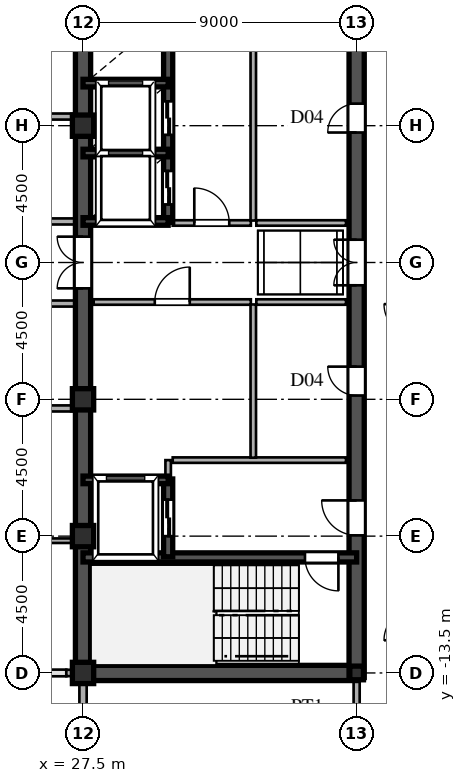
"""IFC4 building model, lengths in metres.
Left out: names, types, materials, properties, quantities, classifications, styles, units other than length and angle.
Written with IfcOpenShell. Run it as: python <this file> out.ifc"""

import sys

from ifc_helpers import new_model, si_unit, direction, frame, frame_2d, origin, origin_2d, place, context, subcontext, project, spatial, rectangle, hollow_rectangle, i_section, extrude, source, transform, mapped, element, fill, save


model = new_model("IFC4")
c1 = context("Model", 3, precision=1e-05, world=origin(), true_north=direction((0.0, 1.0)))
c2 = subcontext(c1, "Body", "Model", "MODEL_VIEW")
j1 = project(units=[si_unit("LENGTHUNIT", "METRE"), si_unit("PLANEANGLEUNIT", "RADIAN")], contexts=[c1])
p1 = place(None, origin())
s1 = spatial("IfcSite", under=j1, at=p1, CompositionType="ELEMENT")
p2 = place(p1, origin())
s2 = spatial("IfcBuilding", under=s1, at=p2, CompositionType="ELEMENT")
p3 = place(p2, frame((0.0, 0.0, 250.65)))
s3 = spatial("IfcBuildingStorey", under=s2, at=p3, CompositionType="ELEMENT", Elevation=250.65)
m1 = source(origin(), c2, "Body", "SweptSolid", [
    extrude(hollow_rectangle(XDim=0.7, YDim=0.7, WallThickness=0.03, at=origin_2d()), origin(), (0.0, 0.0, 1.0), 3.75),
])
for number, where, z_axis, x_axis in (
    (1, (27.5, -13.5, 0.0), (0.0, 0.0, 1.0), (1.0, 0.0, 0.0)),
    (2, (27.5, -9.0, 0.0), (0.0, 0.0, 1.0), (1.0, 0.0, 0.0)),
    (3, (27.5, -4.5, 0.0), (0.0, 0.0, 1.0), (1.0, 0.0, 0.0)),
    (4, (27.5, 4.5, 0.0), (0.0, 0.0, 1.0), (1.0, 0.0, 0.0)),
):
    element("IfcColumn", number, at=place(p3, frame(where, z_axis=z_axis, x_axis=x_axis)), inside=s3, PredefinedType="COLUMN", context=c2, shape_type="MappedRepresentation", body=[
        mapped(m1, transform((0.0, 0.0, 0.0), scale=1.0)),
    ])
m2 = source(origin(), c2, "Body", "SweptSolid", [
    extrude(i_section(OverallWidth=0.45, OverallDepth=0.45, WebThickness=0.016, FlangeThickness=0.025, at=origin_2d()), origin(), (0.0, 0.0, 1.0), 3.75),
])
p4 = place(p3, frame((36.5, -13.5, 0.0), z_axis=(0.0, 0.0, 1.0), x_axis=(1.0, 0.0, 0.0)))
e5 = element("IfcColumn", 5, at=p4, inside=s3, PredefinedType="COLUMN", context=c2, shape_type="MappedRepresentation", body=[
    mapped(m2, transform((0.0, 0.0, 0.0), scale=1.0)),
])
p5 = place(p3, frame((27.5, -15.98, 0.0), z_axis=(0.0, 0.0, 1.0), x_axis=(0.0, 1.0, 0.0)))
e6 = element("IfcWall", 6, at=p5, inside=s3, PredefinedType="SOLIDWALL", context=c2, shape_type="SweptSolid", body=[
    extrude(rectangle(XDim=1.605, YDim=0.24, at=frame_2d((0.803, 0.0))), origin(), (0.0, 0.0, 1.0), 3.53),
])
p6 = place(p3, frame((27.5, -14.375, 0.0), z_axis=(0.0, 0.0, 1.0), x_axis=(0.0, 1.0, 0.0)))
e7 = element("IfcWall", 7, at=p6, inside=s3, PredefinedType="SOLIDWALL", context=c2, shape_type="SweptSolid", body=[
    extrude(rectangle(XDim=0.62, YDim=0.24, at=frame_2d((0.31, 0.0))), origin(), (0.0, 0.0, 1.0), 3.03),
])
p7 = place(p3, frame((26.95, -13.5, 0.0), z_axis=(0.0, 0.0, 1.0), x_axis=(1.0, 0.0, 0.0)))
e8 = element("IfcWall", 8, at=p7, inside=s3, PredefinedType="SOLIDWALL", context=c2, shape_type="SweptSolid", body=[
    extrude(rectangle(XDim=0.54, YDim=0.21, at=frame_2d((0.27, 0.0))), origin(), (0.0, 0.0, 1.0), 3.03),
])
for number, where, z_axis, x_axis in (
    (9, (27.5, -13.5, 0.0), (0.0, 0.0, 1.0), (0.0, 1.0, 0.0)),
    (10, (27.5, 1.3, 0.0), (0.0, 0.0, 1.0), (0.0, 1.0, 0.0)),
):
    element("IfcWall", number, at=place(p3, frame(where, z_axis=z_axis, x_axis=x_axis)), inside=s3, PredefinedType="SHEAR", context=c2, shape_type="SweptSolid", body=[
        extrude(rectangle(XDim=12.2, YDim=0.5, at=frame_2d((6.1, 0.0))), origin(), (0.0, 0.0, 1.0), 3.53),
    ])
p8 = place(p3, frame((27.5, -1.3, 0.0), z_axis=(0.0, 0.0, 1.0), x_axis=(0.0, 1.0, 0.0)))
e11 = element("IfcWall", 11, at=p8, inside=s3, PredefinedType="SHEAR", context=c2, shape_type="SweptSolid", body=[
    extrude(rectangle(XDim=2.6, YDim=0.5, at=frame_2d((1.3, 0.0))), origin(), (0.0, 0.0, 1.0), 3.53),
])
p9 = place(p8, frame((0.45, 0.0, 0.0)))
e12 = element("IfcOpeningElement", 12, at=p9, cuts=e11, PredefinedType="OPENING", context=c2, shape_type="SweptSolid", body=[
    extrude(rectangle(XDim=1.7, YDim=2.35, at=frame_2d((0.85, 1.175))), frame((0.0, 0.26, 0.0), z_axis=(0.0, -1.0, 0.0), x_axis=(1.0, 0.0, 0.0)), (0.0, 0.0, 1.0), 0.52),
])
p10 = place(p3, frame((27.5, -13.5, 0.0), z_axis=(0.0, 0.0, 1.0), x_axis=(1.0, 0.0, 0.0)))
e13 = element("IfcWall", 13, at=p10, inside=s3, PredefinedType="SHEAR", context=c2, shape_type="SweptSolid", body=[
    extrude(rectangle(XDim=9.0, YDim=0.5, at=frame_2d((4.5, 0.0))), origin(), (0.0, 0.0, 1.0), 3.53),
])
p11 = place(p3, frame((36.5, -13.65, 0.0), z_axis=(0.0, 0.0, 1.0), x_axis=(0.0, 1.0, 0.0)))
e14 = element("IfcWall", 14, at=p11, inside=s3, PredefinedType="SHEAR", context=c2, shape_type="SweptSolid", body=[
    extrude(rectangle(XDim=7.15, YDim=0.5, at=frame_2d((3.575, 0.0))), origin(), (0.0, 0.0, 1.0), 3.53),
])
p12 = place(p11, frame((4.675, 0.0, 0.0)))
e15 = element("IfcOpeningElement", 15, at=p12, cuts=e14, PredefinedType="OPENING", context=c2, shape_type="SweptSolid", body=[
    extrude(rectangle(XDim=1.15, YDim=2.2, at=frame_2d((0.575, 1.1))), frame((0.0, 0.26, 0.0), z_axis=(0.0, -1.0, 0.0), x_axis=(1.0, 0.0, 0.0)), (0.0, 0.0, 1.0), 0.52),
])
p13 = place(p3, frame((36.5, -1.3, 0.0), z_axis=(0.0, 0.0, 1.0), x_axis=(0.0, 1.0, 0.0)))
e16 = element("IfcWall", 16, at=p13, inside=s3, PredefinedType="SHEAR", context=c2, shape_type="SweptSolid", body=[
    extrude(rectangle(XDim=2.6, YDim=0.5, at=frame_2d((1.3, 0.0))), origin(), (0.0, 0.0, 1.0), 3.53),
])
p14 = place(p13, frame((0.55, 0.0, 0.0)))
e17 = element("IfcOpeningElement", 17, at=p14, cuts=e16, PredefinedType="OPENING", context=c2, shape_type="SweptSolid", body=[
    extrude(rectangle(XDim=1.5, YDim=2.3, at=frame_2d((0.75, 1.15))), frame((0.0, 0.26, 0.0), z_axis=(0.0, -1.0, 0.0), x_axis=(1.0, 0.0, 0.0)), (0.0, 0.0, 1.0), 0.52),
])
p15 = place(p3, frame((36.5, -6.5, 0.0), z_axis=(0.0, 0.0, 1.0), x_axis=(0.0, 1.0, 0.0)))
e18 = element("IfcWall", 18, at=p15, inside=s3, PredefinedType="SHEAR", context=c2, shape_type="SweptSolid", body=[
    extrude(rectangle(XDim=5.2, YDim=0.5, at=frame_2d((2.6, 0.0))), origin(), (0.0, 0.0, 1.0), 3.53),
])
p16 = place(p15, frame((2.125, 0.0, 0.0)))
e19 = element("IfcOpeningElement", 19, at=p16, cuts=e18, PredefinedType="OPENING", context=c2, shape_type="SweptSolid", body=[
    extrude(rectangle(XDim=0.95, YDim=2.15, at=frame_2d((0.475, 1.075))), frame((0.0, 0.26, 0.0), z_axis=(0.0, -1.0, 0.0), x_axis=(1.0, 0.0, 0.0)), (0.0, 0.0, 1.0), 0.52),
])
p17 = place(p3, frame((36.5, 1.3, 0.0), z_axis=(0.0, 0.0, 1.0), x_axis=(0.0, 1.0, 0.0)))
e20 = element("IfcWall", 20, at=p17, inside=s3, PredefinedType="SHEAR", context=c2, shape_type="SweptSolid", body=[
    extrude(rectangle(XDim=6.9, YDim=0.5, at=frame_2d((3.45, 0.0))), origin(), (0.0, 0.0, 1.0), 3.53),
])
p18 = place(p17, frame((2.975, 0.0, 0.0)))
e21 = element("IfcOpeningElement", 21, at=p18, cuts=e20, PredefinedType="OPENING", context=c2, shape_type="SweptSolid", body=[
    extrude(rectangle(XDim=0.95, YDim=2.15, at=frame_2d((0.475, 1.075))), frame((0.0, 0.26, 0.0), z_axis=(0.0, -1.0, 0.0), x_axis=(1.0, 0.0, 0.0)), (0.0, 0.0, 1.0), 0.52),
])
p19 = place(p3, frame((27.5, -9.7, 0.0), z_axis=(0.0, 0.0, 1.0), x_axis=(1.0, 0.0, 0.0)))
e22 = element("IfcWall", 22, at=p19, inside=s3, PredefinedType="SHEAR", context=c2, shape_type="SweptSolid", body=[
    extrude(rectangle(XDim=9.0, YDim=0.3, at=frame_2d((4.5, 0.0))), origin(), (0.0, 0.0, 1.0), 3.53),
])
p20 = place(p19, frame((7.3, 0.0, 0.0)))
e23 = element("IfcOpeningElement", 23, at=p20, cuts=e22, PredefinedType="OPENING", context=c2, shape_type="SweptSolid", body=[
    extrude(rectangle(XDim=1.1, YDim=2.2, at=frame_2d((0.55, 1.1))), frame((0.0, 0.16, 0.0), z_axis=(0.0, -1.0, 0.0), x_axis=(1.0, 0.0, 0.0)), (0.0, 0.0, 1.0), 0.32),
])
for number, where, z_axis, x_axis in (
    (24, (27.5, -7.15, 0.0), (0.0, 0.0, 1.0), (1.0, 0.0, 0.0)),
    (25, (27.5, 1.35, 0.0), (0.0, 0.0, 1.0), (1.0, 0.0, 0.0)),
    (26, (27.5, 3.6, 0.0), (0.0, 0.0, 1.0), (1.0, 0.0, 0.0)),
    (27, (27.5, 5.9, 0.0), (0.0, 0.0, 1.0), (1.0, 0.0, 0.0)),
):
    element("IfcWall", number, at=place(p3, frame(where, z_axis=z_axis, x_axis=x_axis)), inside=s3, PredefinedType="SHEAR", context=c2, shape_type="SweptSolid", body=[
        extrude(rectangle(XDim=2.8, YDim=0.25, at=frame_2d((1.4, 0.0))), origin(), (0.0, 0.0, 1.0), 3.53),
    ])
p21 = place(p3, frame((30.3, -9.68, 0.0), z_axis=(0.0, 0.0, 1.0), x_axis=(0.0, 1.0, 0.0)))
e28 = element("IfcWall", 28, at=p21, inside=s3, PredefinedType="SHEAR", context=c2, shape_type="SweptSolid", body=[
    extrude(rectangle(XDim=2.56, YDim=0.3, at=frame_2d((1.28, 0.0))), origin(), (0.0, 0.0, 1.0), 3.53),
])
p22 = place(p21, frame((0.68, 0.0, 0.0)))
e29 = element("IfcOpeningElement", 29, at=p22, cuts=e28, PredefinedType="OPENING", context=c2, shape_type="SweptSolid", body=[
    extrude(rectangle(XDim=1.2, YDim=2.25, at=frame_2d((0.6, 1.125))), frame((0.0, 0.16, 0.0), z_axis=(0.0, -1.0, 0.0), x_axis=(1.0, 0.0, 0.0)), (0.0, 0.0, 1.0), 0.32),
])
p23 = place(p3, frame((30.3, 1.32, 0.0), z_axis=(0.0, 0.0, 1.0), x_axis=(0.0, 1.0, 0.0)))
e30 = element("IfcWall", 30, at=p23, inside=s3, PredefinedType="SHEAR", context=c2, shape_type="SweptSolid", body=[
    extrude(rectangle(XDim=2.28, YDim=0.3, at=frame_2d((1.14, 0.0))), origin(), (0.0, 0.0, 1.0), 3.53),
])
p24 = place(p23, frame((0.59, 0.0, 0.0)))
e31 = element("IfcOpeningElement", 31, at=p24, cuts=e30, PredefinedType="OPENING", context=c2, shape_type="SweptSolid", body=[
    extrude(rectangle(XDim=1.1, YDim=2.2, at=frame_2d((0.55, 1.1))), frame((0.0, 0.16, 0.0), z_axis=(0.0, -1.0, 0.0), x_axis=(1.0, 0.0, 0.0)), (0.0, 0.0, 1.0), 0.32),
])
p25 = place(p3, frame((30.3, 3.6, 0.0), z_axis=(0.0, 0.0, 1.0), x_axis=(0.0, 1.0, 0.0)))
e32 = element("IfcWall", 32, at=p25, inside=s3, PredefinedType="SHEAR", context=c2, shape_type="SweptSolid", body=[
    extrude(rectangle(XDim=2.3, YDim=0.3, at=frame_2d((1.15, 0.0))), origin(), (0.0, 0.0, 1.0), 3.53),
])
p26 = place(p25, frame((0.6, 0.0, 0.0)))
e33 = element("IfcOpeningElement", 33, at=p26, cuts=e32, PredefinedType="OPENING", context=c2, shape_type="SweptSolid", body=[
    extrude(rectangle(XDim=1.1, YDim=2.2, at=frame_2d((0.55, 1.1))), frame((0.0, 0.16, 0.0), z_axis=(0.0, -1.0, 0.0), x_axis=(1.0, 0.0, 0.0)), (0.0, 0.0, 1.0), 0.32),
])
p27 = place(p3, frame((30.3, 5.9, 0.0), z_axis=(0.0, 0.0, 1.0), x_axis=(0.0, 1.0, 0.0)))
e34 = element("IfcWall", 34, at=p27, inside=s3, PredefinedType="SHEAR", context=c2, shape_type="SweptSolid", body=[
    extrude(rectangle(XDim=2.25, YDim=0.3, at=frame_2d((1.125, 0.0))), origin(), (0.0, 0.0, 1.0), 3.53),
])
p28 = place(p3, frame((30.45, -6.5, 0.0), z_axis=(0.0, 0.0, 1.0), x_axis=(1.0, 0.0, 0.0)))
e35 = element("IfcWall", 35, at=p28, inside=s3, PredefinedType="PARTITIONING", context=c2, shape_type="SweptSolid", body=[
    extrude(rectangle(XDim=5.7, YDim=0.18, at=frame_2d((2.85, 0.0))), origin(), (0.0, 0.0, 1.0), 3.53),
])
p29 = place(p3, frame((30.3, -7.12, 0.0), z_axis=(0.0, 0.0, 1.0), x_axis=(0.0, 1.0, 0.0)))
e36 = element("IfcWall", 36, at=p29, inside=s3, PredefinedType="PARTITIONING", context=c2, shape_type="SweptSolid", body=[
    extrude(rectangle(XDim=0.62, YDim=0.18, at=frame_2d((0.31, 0.0))), origin(), (0.0, 0.0, 1.0), 3.53),
])
p30 = place(p3, frame((33.1, -6.42, 0.0), z_axis=(0.0, 0.0, 1.0), x_axis=(0.0, 1.0, 0.0)))
e37 = element("IfcWall", 37, at=p30, inside=s3, PredefinedType="PARTITIONING", context=c2, shape_type="SweptSolid", body=[
    extrude(rectangle(XDim=5.04, YDim=0.18, at=frame_2d((2.52, 0.0))), origin(), (0.0, 0.0, 1.0), 3.53),
])
p31 = place(p3, frame((33.1, 1.38, 0.0), z_axis=(0.0, 0.0, 1.0), x_axis=(0.0, 1.0, 0.0)))
e38 = element("IfcWall", 38, at=p31, inside=s3, PredefinedType="PARTITIONING", context=c2, shape_type="SweptSolid", body=[
    extrude(rectangle(XDim=6.74, YDim=0.18, at=frame_2d((3.37, 0.0))), origin(), (0.0, 0.0, 1.0), 3.53),
])
p32 = place(p3, frame((27.85, -1.3, 0.0), z_axis=(0.0, 0.0, 1.0), x_axis=(1.0, 0.0, 0.0)))
e39 = element("IfcWall", 39, at=p32, inside=s3, PredefinedType="PARTITIONING", context=c2, shape_type="SweptSolid", body=[
    extrude(rectangle(XDim=5.17, YDim=0.18, at=frame_2d((2.585, 0.0))), origin(), (0.0, 0.0, 1.0), 3.53),
])
p33 = place(p32, frame((2.01, 0.0, 0.0)))
e40 = element("IfcOpeningElement", 40, at=p33, cuts=e39, PredefinedType="OPENING", context=c2, shape_type="SweptSolid", body=[
    extrude(rectangle(XDim=1.15, YDim=2.2, at=frame_2d((0.575, 1.1))), frame((0.0, 0.1, 0.0), z_axis=(0.0, -1.0, 0.0), x_axis=(1.0, 0.0, 0.0)), (0.0, 0.0, 1.0), 0.2),
])
p34 = place(p3, frame((30.45, 1.3, 0.0), z_axis=(0.0, 0.0, 1.0), x_axis=(1.0, 0.0, 0.0)))
e41 = element("IfcWall", 41, at=p34, inside=s3, PredefinedType="PARTITIONING", context=c2, shape_type="SweptSolid", body=[
    extrude(rectangle(XDim=2.57, YDim=0.18, at=frame_2d((1.285, 0.0))), origin(), (0.0, 0.0, 1.0), 3.53),
])
p35 = place(p34, frame((0.71, 0.0, 0.0)))
e42 = element("IfcOpeningElement", 42, at=p35, cuts=e41, PredefinedType="OPENING", context=c2, shape_type="SweptSolid", body=[
    extrude(rectangle(XDim=1.15, YDim=2.2, at=frame_2d((0.575, 1.1))), frame((0.0, 0.1, 0.0), z_axis=(0.0, -1.0, 0.0), x_axis=(1.0, 0.0, 0.0)), (0.0, 0.0, 1.0), 0.2),
])
for number, where, z_axis, x_axis in (
    (43, (33.2, -1.3, 0.0), (0.0, 0.0, 1.0), (1.0, 0.0, 0.0)),
    (44, (33.2, 1.3, 0.0), (0.0, 0.0, 1.0), (1.0, 0.0, 0.0)),
):
    element("IfcWall", number, at=place(p3, frame(where, z_axis=z_axis, x_axis=x_axis)), inside=s3, PredefinedType="PARTITIONING", context=c2, shape_type="SweptSolid", body=[
        extrude(rectangle(XDim=2.95, YDim=0.18, at=frame_2d((1.475, 0.0))), origin(), (0.0, 0.0, 1.0), 3.53),
    ])
p36 = place(p3, frame((7.085, -9.15, 0.0), z_axis=(0.0, 0.0, 1.0), x_axis=(1.0, 0.0, 0.0)))
e45 = element("IfcWall", 45, at=p36, inside=s3, PredefinedType="PARTITIONING", context=c2, shape_type="SweptSolid", body=[
    extrude(rectangle(XDim=20.16, YDim=0.15, at=frame_2d((10.08, 0.0))), origin(), (0.0, 0.0, 1.0), 3.53),
])
p37 = place(p36, frame((3.44, 0.0, 0.0)))
e46 = element("IfcOpeningElement", 46, at=p37, cuts=e45, PredefinedType="OPENING", context=c2, shape_type="SweptSolid", body=[
    extrude(rectangle(XDim=0.95, YDim=2.15, at=frame_2d((0.475, 1.075))), frame((0.0, 0.085, 0.0), z_axis=(0.0, -1.0, 0.0), x_axis=(1.0, 0.0, 0.0)), (0.0, 0.0, 1.0), 0.17),
])
p38 = place(p36, frame((10.69, 0.0, 0.0)))
e47 = element("IfcOpeningElement", 47, at=p38, cuts=e45, PredefinedType="OPENING", context=c2, shape_type="SweptSolid", body=[
    extrude(rectangle(XDim=0.95, YDim=2.15, at=frame_2d((0.475, 1.075))), frame((0.0, 0.085, 0.0), z_axis=(0.0, -1.0, 0.0), x_axis=(1.0, 0.0, 0.0)), (0.0, 0.0, 1.0), 0.17),
])
p39 = place(p36, frame((16.94, 0.0, 0.0)))
e48 = element("IfcOpeningElement", 48, at=p39, cuts=e45, PredefinedType="OPENING", context=c2, shape_type="SweptSolid", body=[
    extrude(rectangle(XDim=0.95, YDim=2.15, at=frame_2d((0.475, 1.075))), frame((0.0, 0.085, 0.0), z_axis=(0.0, -1.0, 0.0), x_axis=(1.0, 0.0, 0.0)), (0.0, 0.0, 1.0), 0.17),
])
p40 = place(p3, frame((-27.245, -4.8, 0.0), z_axis=(0.0, 0.0, 1.0), x_axis=(1.0, 0.0, 0.0)))
e49 = element("IfcWall", 49, at=p40, inside=s3, PredefinedType="PARTITIONING", context=c2, shape_type="SweptSolid", body=[
    extrude(rectangle(XDim=54.49, YDim=0.2, at=frame_2d((27.245, 0.0))), origin(), (0.0, 0.0, 1.0), 3.53),
])
p41 = place(p40, frame((24.97, 0.0, 0.0)))
e50 = element("IfcOpeningElement", 50, at=p41, cuts=e49, PredefinedType="OPENING", context=c2, shape_type="SweptSolid", body=[
    extrude(rectangle(XDim=1.05, YDim=2.25, at=frame_2d((0.525, 1.125))), frame((0.0, 0.11, 0.0), z_axis=(0.0, -1.0, 0.0), x_axis=(1.0, 0.0, 0.0)), (0.0, 0.0, 1.0), 0.22),
])
p42 = place(p3, frame((7.085, -1.35, 0.0), z_axis=(0.0, 0.0, 1.0), x_axis=(1.0, 0.0, 0.0)))
e51 = element("IfcWall", 51, at=p42, inside=s3, PredefinedType="PARTITIONING", context=c2, shape_type="SweptSolid", body=[
    extrude(rectangle(XDim=20.16, YDim=0.2, at=frame_2d((10.08, 0.0))), origin(), (0.0, 0.0, 1.0), 3.53),
])
p43 = place(p42, frame((6.14, 0.0, 0.0)))
e52 = element("IfcOpeningElement", 52, at=p43, cuts=e51, PredefinedType="OPENING", context=c2, shape_type="SweptSolid", body=[
    extrude(rectangle(XDim=1.05, YDim=2.25, at=frame_2d((0.525, 1.125))), frame((0.0, 0.11, 0.0), z_axis=(0.0, -1.0, 0.0), x_axis=(1.0, 0.0, 0.0)), (0.0, 0.0, 1.0), 0.22),
])
p44 = place(p3, frame((7.085, 1.35, 0.0), z_axis=(0.0, 0.0, 1.0), x_axis=(1.0, 0.0, 0.0)))
e53 = element("IfcWall", 53, at=p44, inside=s3, PredefinedType="PARTITIONING", context=c2, shape_type="SweptSolid", body=[
    extrude(rectangle(XDim=20.16, YDim=0.2, at=frame_2d((10.08, 0.0))), origin(), (0.0, 0.0, 1.0), 3.53),
])
p45 = place(p44, frame((6.14, 0.0, 0.0)))
e54 = element("IfcOpeningElement", 54, at=p45, cuts=e53, PredefinedType="OPENING", context=c2, shape_type="SweptSolid", body=[
    extrude(rectangle(XDim=1.05, YDim=2.25, at=frame_2d((0.525, 1.125))), frame((0.0, 0.11, 0.0), z_axis=(0.0, -1.0, 0.0), x_axis=(1.0, 0.0, 0.0)), (0.0, 0.0, 1.0), 0.22),
])
p46 = place(p3, frame((-27.245, 4.8, 0.0), z_axis=(0.0, 0.0, 1.0), x_axis=(1.0, 0.0, 0.0)))
e55 = element("IfcWall", 55, at=p46, inside=s3, PredefinedType="PARTITIONING", context=c2, shape_type="SweptSolid", body=[
    extrude(rectangle(XDim=54.49, YDim=0.2, at=frame_2d((27.245, 0.0))), origin(), (0.0, 0.0, 1.0), 3.53),
])
p47 = place(p46, frame((24.97, 0.0, 0.0)))
e56 = element("IfcOpeningElement", 56, at=p47, cuts=e55, PredefinedType="OPENING", context=c2, shape_type="SweptSolid", body=[
    extrude(rectangle(XDim=1.05, YDim=2.25, at=frame_2d((0.525, 1.125))), frame((0.0, 0.11, 0.0), z_axis=(0.0, -1.0, 0.0), x_axis=(1.0, 0.0, 0.0)), (0.0, 0.0, 1.0), 0.22),
])
p48 = place(p3, frame((36.5, -15.515, 0.0), z_axis=(0.0, 0.0, 1.0), x_axis=(0.0, 1.0, 0.0)))
e57 = element("IfcWall", 57, at=p48, inside=s3, PredefinedType="PARTITIONING", context=c2, shape_type="SweptSolid", body=[
    extrude(rectangle(XDim=1.76, YDim=0.2, at=frame_2d((0.88, 0.0))), origin(), (0.0, 0.0, 1.0), 2.93),
])
m3 = source(origin(), c2, "Body", "SweptSolid", [
    extrude(rectangle(XDim=1.7, YDim=2.35, at=frame_2d((0.85, 1.175))), frame((0.0, 0.025, 0.0), z_axis=(0.0, -1.0, 0.0), x_axis=(1.0, 0.0, 0.0)), (0.0, 0.0, 1.0), 0.05),
])
p49 = place(p9, origin())
e58 = element("IfcDoor", 58, at=p49, inside=s3, OperationType="DOUBLE_SWING_LEFT", PredefinedType="DOOR", context=c2, shape_type="MappedRepresentation", body=[
    mapped(m3, transform((0.0, 0.0, 0.0), scale=1.0)),
])
fill(e12, e58)
m4 = source(origin(), c2, "Body", "SweptSolid", [
    extrude(rectangle(XDim=1.15, YDim=2.2, at=frame_2d((0.575, 1.1))), frame((0.0, 0.025, 0.0), z_axis=(0.0, -1.0, 0.0), x_axis=(1.0, 0.0, 0.0)), (0.0, 0.0, 1.0), 0.05),
])
p50 = place(p12, origin())
e59 = element("IfcDoor", 59, at=p50, inside=s3, OperationType="SINGLE_SWING_RIGHT", PredefinedType="DOOR", context=c2, shape_type="MappedRepresentation", body=[
    mapped(m4, transform((0.0, 0.0, 0.0), scale=1.0)),
])
fill(e15, e59)
m5 = source(origin(), c2, "Body", "SweptSolid", [
    extrude(rectangle(XDim=1.5, YDim=2.3, at=frame_2d((0.75, 1.15))), frame((0.0, 0.025, 0.0), z_axis=(0.0, -1.0, 0.0), x_axis=(1.0, 0.0, 0.0)), (0.0, 0.0, 1.0), 0.05),
])
p51 = place(p14, origin())
e60 = element("IfcDoor", 60, at=p51, inside=s3, OperationType="DOUBLE_SWING_LEFT", PredefinedType="DOOR", context=c2, shape_type="MappedRepresentation", body=[
    mapped(m5, transform((0.0, 0.0, 0.0), scale=1.0)),
])
fill(e17, e60)
m6 = source(origin(), c2, "Body", "SweptSolid", [
    extrude(rectangle(XDim=0.95, YDim=2.15, at=frame_2d((0.475, 1.075))), frame((0.0, 0.025, 0.0), z_axis=(0.0, -1.0, 0.0), x_axis=(1.0, 0.0, 0.0)), (0.0, 0.0, 1.0), 0.05),
])
p52 = place(p16, origin())
e61 = element("IfcDoor", 61, at=p52, inside=s3, OperationType="SINGLE_SWING_RIGHT", PredefinedType="DOOR", context=c2, shape_type="MappedRepresentation", body=[
    mapped(m6, transform((0.0, 0.0, 0.0), scale=1.0)),
])
fill(e19, e61)
p53 = place(p18, origin())
e62 = element("IfcDoor", 62, at=p53, inside=s3, OperationType="SINGLE_SWING_LEFT", PredefinedType="DOOR", context=c2, shape_type="MappedRepresentation", body=[
    mapped(m6, transform((0.0, 0.0, 0.0), scale=1.0)),
])
fill(e21, e62)
m7 = source(origin(), c2, "Body", "SweptSolid", [
    extrude(rectangle(XDim=1.1, YDim=2.2, at=frame_2d((0.55, 1.1))), frame((0.0, 0.025, 0.0), z_axis=(0.0, -1.0, 0.0), x_axis=(1.0, 0.0, 0.0)), (0.0, 0.0, 1.0), 0.05),
])
p54 = place(p20, frame((1.1, 0.0, 0.0), z_axis=(0.0, 0.0, 1.0), x_axis=(-1.0, 0.0, 0.0)))
e63 = element("IfcDoor", 63, at=p54, inside=s3, OperationType="SINGLE_SWING_RIGHT", PredefinedType="DOOR", context=c2, shape_type="MappedRepresentation", body=[
    mapped(m7, transform((0.0, 0.0, 0.0), scale=1.0)),
])
fill(e23, e63)
m8 = source(origin(), c2, "Body", "SweptSolid", [
    extrude(rectangle(XDim=1.2, YDim=2.25, at=frame_2d((0.6, 1.125))), frame((0.0, 0.025, 0.0), z_axis=(0.0, -1.0, 0.0), x_axis=(1.0, 0.0, 0.0)), (0.0, 0.0, 1.0), 0.05),
])
p55 = place(p22, origin())
e64 = element("IfcDoor", 64, at=p55, inside=s3, OperationType="DOUBLE_DOOR_SLIDING", PredefinedType="DOOR", context=c2, shape_type="MappedRepresentation", body=[
    mapped(m8, transform((0.0, 0.0, 0.0), scale=1.0)),
])
fill(e29, e64)
m9 = source(origin(), c2, "Body", "SweptSolid", [
    extrude(rectangle(XDim=1.1, YDim=2.2, at=frame_2d((0.55, 1.1))), frame((0.0, 0.025, 0.0), z_axis=(0.0, -1.0, 0.0), x_axis=(1.0, 0.0, 0.0)), (0.0, 0.0, 1.0), 0.05),
])
p56 = place(p24, origin())
e65 = element("IfcDoor", 65, at=p56, inside=s3, OperationType="DOUBLE_DOOR_SLIDING", PredefinedType="DOOR", context=c2, shape_type="MappedRepresentation", body=[
    mapped(m9, transform((0.0, 0.0, 0.0), scale=1.0)),
])
fill(e31, e65)
p57 = place(p26, origin())
e66 = element("IfcDoor", 66, at=p57, inside=s3, OperationType="DOUBLE_DOOR_SLIDING", PredefinedType="DOOR", context=c2, shape_type="MappedRepresentation", body=[
    mapped(m9, transform((0.0, 0.0, 0.0), scale=1.0)),
])
fill(e33, e66)
p58 = place(p33, origin())
e67 = element("IfcDoor", 67, at=p58, inside=s3, OperationType="SINGLE_SWING_RIGHT", PredefinedType="DOOR", context=c2, shape_type="MappedRepresentation", body=[
    mapped(m4, transform((0.0, 0.0, 0.0), scale=1.0)),
])
fill(e40, e67)
p59 = place(p35, origin())
e68 = element("IfcDoor", 68, at=p59, inside=s3, OperationType="SINGLE_SWING_LEFT", PredefinedType="DOOR", context=c2, shape_type="MappedRepresentation", body=[
    mapped(m4, transform((0.0, 0.0, 0.0), scale=1.0)),
])
fill(e42, e68)
save(model, sys.argv[1])
